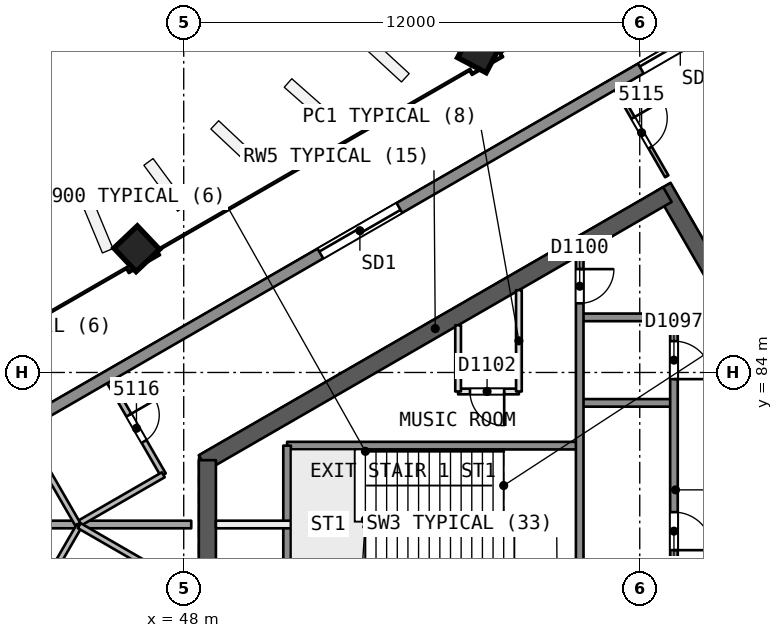
"""IFC4 building model, lengths in metres.
Left out: names, types, materials, properties, quantities, classifications, styles, units other than length and angle.
Written with IfcOpenShell. Run it as: python <this file> out.ifc"""

import sys

from ifc_helpers import new_model, si_unit, direction, frame, frame_2d, origin, origin_2d, place, context, subcontext, project, spatial, rectangle, extrude, element, fill, save


model = new_model("IFC4")
c1 = context("Model", 3, precision=1e-05, world=origin(), true_north=direction((0.0, 1.0)))
c2 = subcontext(c1, "Body", "Model", "MODEL_VIEW")
j1 = project(units=[si_unit("LENGTHUNIT", "METRE"), si_unit("PLANEANGLEUNIT", "RADIAN")], contexts=[c1])
p1 = place(None, origin())
s1 = spatial("IfcSite", under=j1, at=p1, CompositionType="ELEMENT")
p2 = place(p1, origin())
s2 = spatial("IfcBuilding", under=s1, at=p2, CompositionType="ELEMENT")
p3 = place(p2, frame((0.0, 0.0, 209.5)))
s3 = spatial("IfcBuildingStorey", under=s2, at=p3, CompositionType="ELEMENT", Elevation=209.5)
p4 = place(p3, frame((65.74, 80.0, 0.0), z_axis=(0.0, 0.0, 1.0), x_axis=(-0.499991857942, 0.866030104553, 0.0)))
e1 = element("IfcWall", 1, at=p4, inside=s3, PredefinedType="SHEAR", context=c2, shape_type="SweptSolid", body=[
    extrude(rectangle(XDim=10.25, YDim=0.45, at=frame_2d((5.125, 0.0))), origin(), (0.0, 0.0, 1.0), 3.7),
])
p5 = place(p4, frame((0.82, 0.0, 0.0)))
e2 = element("IfcOpeningElement", 2, at=p5, cuts=e1, PredefinedType="OPENING", context=c2, shape_type="SweptSolid", body=[
    extrude(rectangle(XDim=1.2, YDim=2.1, at=frame_2d((0.6, 1.05))), frame((0.0, 0.235, 0.0), z_axis=(0.0, -1.0, 0.0), x_axis=(1.0, 0.0, 0.0)), (0.0, 0.0, 1.0), 0.471),
])
p6 = place(p3, frame((60.728, 88.682, 0.0), z_axis=(0.0, 0.0, 1.0), x_axis=(-0.866021613849, -0.500006564303, 0.0)))
e3 = element("IfcWall", 3, at=p6, inside=s3, PredefinedType="SHEAR", context=c2, shape_type="SweptSolid", body=[
    extrude(rectangle(XDim=14.108, YDim=0.45, at=frame_2d((7.054, 0.0))), origin(), (0.0, 0.0, 1.0), 3.7),
])
p7 = place(p3, frame((48.622, 81.693, 0.0), z_axis=(0.0, 0.0, 1.0), x_axis=(0.0, -1.0, 0.0)))
e4 = element("IfcWall", 4, at=p7, inside=s3, PredefinedType="SHEAR", context=c2, shape_type="SweptSolid", body=[
    extrude(rectangle(XDim=3.515, YDim=0.45, at=frame_2d((1.758, 0.0))), origin(), (0.0, 0.0, 1.0), 3.7),
])
p8 = place(p3, frame((60.728, 71.318, 0.0), z_axis=(0.0, 0.0, 1.0), x_axis=(0.500012416173, 0.866018235185, 0.0)))
e5 = element("IfcWall", 5, at=p8, inside=s3, PredefinedType="SHEAR", context=c2, shape_type="SweptSolid", body=[
    extrude(rectangle(XDim=10.155, YDim=0.45, at=frame_2d((5.078, 0.0))), origin(), (0.0, 0.0, 1.0), 3.7),
])
p9 = place(p8, frame((8.005, 0.0, 0.0)))
e6 = element("IfcOpeningElement", 6, at=p9, cuts=e5, PredefinedType="OPENING", context=c2, shape_type="SweptSolid", body=[
    extrude(rectangle(XDim=1.2, YDim=2.1, at=frame_2d((0.6, 1.05))), frame((0.0, 0.235, 0.0), z_axis=(0.0, -1.0, 0.0), x_axis=(1.0, 0.0, 0.0)), (0.0, 0.0, 1.0), 0.471),
])
p10 = place(p3, frame((55.758, 92.477, 0.0), z_axis=(0.019328516974, -0.012138044789, 0.999739504221), x_axis=(-0.500214302693, 0.865666432488, 0.020181155676)))
e7 = element("IfcColumn", 7, at=p10, inside=s3, PredefinedType="COLUMN", context=c2, shape_type="SweptSolid", body=[
    extrude(rectangle(XDim=0.85, YDim=0.85, at=origin_2d()), origin(), (0.0, 0.0, 1.0), 3.701),
])
p11 = place(p3, frame((46.729, 87.264, 0.0), z_axis=(0.02855911485, -0.006793507689, 0.999569019734), x_axis=(-0.50039805324, 0.86556025987, 0.020179812855)))
e8 = element("IfcColumn", 8, at=p11, inside=s3, PredefinedType="COLUMN", context=c2, shape_type="SweptSolid", body=[
    extrude(rectangle(XDim=0.85, YDim=0.85, at=origin_2d()), origin(), (0.0, 0.0, 1.0), 3.702),
])
p12 = place(p3, frame((59.386, 91.455, 0.0), z_axis=(0.0, 0.0, 1.0), x_axis=(0.49995654735, -0.86605048973, 0.0)))
e9 = element("IfcWall", 9, at=p12, inside=s3, PredefinedType="PARTITIONING", context=c2, shape_type="SweptSolid", body=[
    extrude(rectangle(XDim=2.648, YDim=0.1, at=frame_2d((1.324, 0.0))), origin(), (0.0, 0.0, 1.0), 3.3),
])
p13 = place(p12, frame((0.874, 0.0, 0.0)))
e10 = element("IfcOpeningElement", 10, at=p13, cuts=e9, PredefinedType="OPENING", context=c2, shape_type="SweptSolid", body=[
    extrude(rectangle(XDim=0.9, YDim=2.1, at=frame_2d((0.45, 1.05))), frame((0.0, 0.061, 0.0), z_axis=(0.0, -1.0, 0.0), x_axis=(1.0, 0.0, 0.0)), (0.0, 0.0, 1.0), 0.121),
])
p14 = place(p3, frame((46.05, 83.755, 0.0), z_axis=(0.0, 0.0, 1.0), x_axis=(0.500051559782, -0.865995633684, 0.0)))
e11 = element("IfcWall", 11, at=p14, inside=s3, PredefinedType="PARTITIONING", context=c2, shape_type="SweptSolid", body=[
    extrude(rectangle(XDim=2.825, YDim=0.15, at=frame_2d((1.413, 0.0))), origin(), (0.0, 0.0, 1.0), 3.3),
])
p15 = place(p14, frame((1.013, 0.0, 0.0)))
e12 = element("IfcOpeningElement", 12, at=p15, cuts=e11, PredefinedType="OPENING", context=c2, shape_type="SweptSolid", body=[
    extrude(rectangle(XDim=0.8, YDim=2.1, at=frame_2d((0.4, 1.05))), frame((0.0, 0.085, 0.0), z_axis=(0.0, -1.0, 0.0), x_axis=(1.0, 0.0, 0.0)), (0.0, 0.0, 1.0), 0.171),
])
p16 = place(p3, frame((47.462, 81.308, 0.0), z_axis=(0.0, 0.0, 1.0), x_axis=(-0.866021400173, -0.500006934395, 0.0)))
e13 = element("IfcWall", 13, at=p16, inside=s3, PredefinedType="PARTITIONING", context=c2, shape_type="SweptSolid", body=[
    extrude(rectangle(XDim=2.6, YDim=0.15, at=frame_2d((1.3, 0.0))), origin(), (0.0, 0.0, 1.0), 3.3),
])
p17 = place(p3, frame((45.211, 80.008, 0.0), z_axis=(0.0, 0.0, 1.0), x_axis=(-0.499954589381, 0.86605162003, 0.0)))
e14 = element("IfcWall", 14, at=p17, inside=s3, PredefinedType="PARTITIONING", context=c2, shape_type="SweptSolid", body=[
    extrude(rectangle(XDim=2.519, YDim=0.15, at=frame_2d((1.259, 0.0))), origin(), (0.0, 0.0, 1.0), 3.3),
])
p18 = place(p3, frame((43.951, 80.0, 0.0), z_axis=(0.0, 0.0, 1.0), x_axis=(1.0, 0.0, 0.0)))
e15 = element("IfcWall", 15, at=p18, inside=s3, PredefinedType="PARTITIONING", context=c2, shape_type="SweptSolid", body=[
    extrude(rectangle(XDim=4.247, YDim=0.2, at=frame_2d((2.123, 0.0))), origin(), (0.0, 0.0, 1.0), 3.3),
])
p19 = place(p3, frame((43.951, 77.718, 0.0), z_axis=(0.0, 0.0, 1.0), x_axis=(0.499988060406, 0.866032297002, 0.0)))
e16 = element("IfcWall", 16, at=p19, inside=s3, PredefinedType="PARTITIONING", context=c2, shape_type="SweptSolid", body=[
    extrude(rectangle(XDim=2.599, YDim=0.15, at=frame_2d((1.3, 0.0))), origin(), (0.0, 0.0, 1.0), 3.3),
])
p20 = place(p3, frame((45.251, 79.969, 0.0), z_axis=(0.0, 0.0, 1.0), x_axis=(0.866062058628, -0.499936506574, 0.0)))
e17 = element("IfcWall", 17, at=p20, inside=s3, PredefinedType="PARTITIONING", context=c2, shape_type="SweptSolid", body=[
    extrude(rectangle(XDim=2.6, YDim=0.15, at=frame_2d((1.3, 0.0))), origin(), (0.0, 0.0, 1.0), 3.3),
])
p21 = place(p3, frame((43.802, 82.63, 0.0), z_axis=(0.0, 0.0, 1.0), x_axis=(0.866026224187, 0.499998579018, 0.0)))
e18 = element("IfcWall", 18, at=p21, inside=s3, PredefinedType="SOLIDWALL", context=c2, shape_type="SweptSolid", body=[
    extrude(rectangle(XDim=51.406, YDim=0.3, at=frame_2d((25.703, 0.0))), origin(), (0.0, 0.0, 1.0), 3.3),
])
p22 = place(p21, frame((24.503, 0.0, 0.0)))
e19 = element("IfcOpeningElement", 19, at=p22, cuts=e18, PredefinedType="OPENING", context=c2, shape_type="SweptSolid", body=[
    extrude(rectangle(XDim=2.4, YDim=2.4, at=frame_2d((1.2, 1.2))), frame((0.0, 0.161, 0.0), z_axis=(0.0, -1.0, 0.0), x_axis=(1.0, 0.0, 0.0)), (0.0, 0.0, 1.0), 0.321),
])
p23 = place(p21, frame((30.271, 0.0, 0.0)))
e20 = element("IfcOpeningElement", 20, at=p23, cuts=e18, PredefinedType="OPENING", context=c2, shape_type="SweptSolid", body=[
    extrude(rectangle(XDim=2.4, YDim=2.4, at=frame_2d((1.2, 1.2))), frame((0.0, 0.161, 0.0), z_axis=(0.0, -1.0, 0.0), x_axis=(1.0, 0.0, 0.0)), (0.0, 0.0, 1.0), 0.321),
])
p24 = place(p21, frame((39.983, 0.0, 0.0)))
e21 = element("IfcOpeningElement", 21, at=p24, cuts=e18, PredefinedType="OPENING", context=c2, shape_type="SweptSolid", body=[
    extrude(rectangle(XDim=2.4, YDim=2.4, at=frame_2d((1.2, 1.2))), frame((0.0, 0.161, 0.0), z_axis=(0.0, -1.0, 0.0), x_axis=(1.0, 0.0, 0.0)), (0.0, 0.0, 1.0), 0.321),
])
p25 = place(p21, frame((18.736, 0.0, 0.0)))
e22 = element("IfcOpeningElement", 22, at=p25, cuts=e18, PredefinedType="OPENING", context=c2, shape_type="SweptSolid", body=[
    extrude(rectangle(XDim=2.4, YDim=2.4, at=frame_2d((1.2, 1.2))), frame((0.0, 0.161, 0.0), z_axis=(0.0, -1.0, 0.0), x_axis=(1.0, 0.0, 0.0)), (0.0, 0.0, 1.0), 0.321),
])
p26 = place(p21, frame((9.0, 0.0, 0.0)))
e23 = element("IfcOpeningElement", 23, at=p26, cuts=e18, PredefinedType="OPENING", context=c2, shape_type="SweptSolid", body=[
    extrude(rectangle(XDim=2.4, YDim=2.4, at=frame_2d((1.2, 1.2))), frame((0.0, 0.161, 0.0), z_axis=(0.0, -1.0, 0.0), x_axis=(1.0, 0.0, 0.0)), (0.0, 0.0, 1.0), 0.321),
])
p27 = place(p3, frame((60.9, 85.45, 0.0), z_axis=(0.0, 0.0, 1.0), x_axis=(-1.0, 0.0, 0.0)))
e24 = element("IfcWall", 24, at=p27, inside=s3, PredefinedType="SOLIDWALL", context=c2, shape_type="SweptSolid", body=[
    extrude(rectangle(XDim=2.48, YDim=0.2, at=frame_2d((1.24, 0.0))), origin(), (0.0, 0.0, 1.0), 3.3),
])
p28 = place(p3, frame((56.82, 83.5, 0.0), z_axis=(0.0, 0.0, 1.0), x_axis=(-1.0, 0.0, 0.0)))
e25 = element("IfcWall", 25, at=p28, inside=s3, PredefinedType="PARTITIONING", context=c2, shape_type="SweptSolid", body=[
    extrude(rectangle(XDim=1.6, YDim=0.15, at=frame_2d((0.8, 0.0))), origin(), (0.0, 0.0, 1.0), 3.3),
])
p29 = place(p28, frame((0.387, 0.0, 0.0)))
e26 = element("IfcOpeningElement", 26, at=p29, cuts=e25, PredefinedType="OPENING", context=c2, shape_type="SweptSolid", body=[
    extrude(rectangle(XDim=0.9, YDim=2.1, at=frame_2d((0.45, 1.05))), frame((0.0, 0.085, 0.0), z_axis=(0.0, -1.0, 0.0), x_axis=(1.0, 0.0, 0.0)), (0.0, 0.0, 1.0), 0.171),
])
p30 = place(p3, frame((60.9, 83.2, 0.0), z_axis=(0.0, 0.0, 1.0), x_axis=(-1.0, 0.0, 0.0)))
e27 = element("IfcWall", 27, at=p30, inside=s3, PredefinedType="SOLIDWALL", context=c2, shape_type="SweptSolid", body=[
    extrude(rectangle(XDim=2.48, YDim=0.2, at=frame_2d((1.24, 0.0))), origin(), (0.0, 0.0, 1.0), 3.3),
])
p31 = place(p3, frame((58.42, 82.075, 0.0), z_axis=(0.0, 0.0, 1.0), x_axis=(-1.0, 0.0, 0.0)))
e28 = element("IfcWall", 28, at=p31, inside=s3, PredefinedType="SOLIDWALL", context=c2, shape_type="SweptSolid", body=[
    extrude(rectangle(XDim=7.7, YDim=0.2, at=frame_2d((3.85, 0.0))), origin(), (0.0, 0.0, 1.0), 3.3),
])
p32 = place(p3, frame((50.82, 80.0, 0.0), z_axis=(0.0, 0.0, 1.0), x_axis=(-1.0, 0.0, 0.0)))
e29 = element("IfcWall", 29, at=p32, inside=s3, PredefinedType="PARTITIONING", context=c2, shape_type="SweptSolid", body=[
    extrude(rectangle(XDim=1.973, YDim=0.2, at=frame_2d((0.987, 0.0))), origin(), (0.0, 0.0, 1.0), 3.3),
])
p33 = place(p3, frame((60.9, 85.45, 0.0), z_axis=(0.0, 0.0, 1.0), x_axis=(0.0, -1.0, 0.0)))
e30 = element("IfcWall", 30, at=p33, inside=s3, PredefinedType="SOLIDWALL", context=c2, shape_type="SweptSolid", body=[
    extrude(rectangle(XDim=10.9, YDim=0.2, at=frame_2d((5.45, 0.0))), origin(), (0.0, 0.0, 1.0), 3.3),
])
p34 = place(p33, frame((0.625, 0.0, 0.0)))
e31 = element("IfcOpeningElement", 31, at=p34, cuts=e30, PredefinedType="OPENING", context=c2, shape_type="SweptSolid", body=[
    extrude(rectangle(XDim=1.0, YDim=2.1, at=frame_2d((0.5, 1.05))), frame((0.0, 0.11, 0.0), z_axis=(0.0, -1.0, 0.0), x_axis=(1.0, 0.0, 0.0)), (0.0, 0.0, 1.0), 0.221),
])
p35 = place(p33, frame((5.125, 0.0, 0.0)))
e32 = element("IfcOpeningElement", 32, at=p35, cuts=e30, PredefinedType="OPENING", context=c2, shape_type="SweptSolid", body=[
    extrude(rectangle(XDim=1.0, YDim=2.1, at=frame_2d((0.5, 1.05))), frame((0.0, 0.11, 0.0), z_axis=(0.0, -1.0, 0.0), x_axis=(1.0, 0.0, 0.0)), (0.0, 0.0, 1.0), 0.221),
])
p36 = place(p3, frame((58.42, 87.09, 0.0), z_axis=(0.0, 0.0, 1.0), x_axis=(0.0, -1.0, 0.0)))
e33 = element("IfcWall", 33, at=p36, inside=s3, PredefinedType="SOLIDWALL", context=c2, shape_type="SweptSolid", body=[
    extrude(rectangle(XDim=10.64, YDim=0.2, at=frame_2d((5.32, 0.0))), origin(), (0.0, 0.0, 1.0), 3.3),
])
p37 = place(p36, frame((0.37, 0.0, 0.0)))
e34 = element("IfcOpeningElement", 34, at=p37, cuts=e33, PredefinedType="OPENING", context=c2, shape_type="SweptSolid", body=[
    extrude(rectangle(XDim=0.9, YDim=2.1, at=frame_2d((0.45, 1.05))), frame((0.0, 0.11, 0.0), z_axis=(0.0, -1.0, 0.0), x_axis=(1.0, 0.0, 0.0)), (0.0, 0.0, 1.0), 0.221),
])
p38 = place(p3, frame((56.82, 86.166, 0.0), z_axis=(0.0, 0.0, 1.0), x_axis=(0.0, -1.0, 0.0)))
e35 = element("IfcWall", 35, at=p38, inside=s3, PredefinedType="PARTITIONING", context=c2, shape_type="SweptSolid", body=[
    extrude(rectangle(XDim=2.666, YDim=0.15, at=frame_2d((1.333, 0.0))), origin(), (0.0, 0.0, 1.0), 3.3),
])
p39 = place(p3, frame((55.22, 85.242, 0.0), z_axis=(0.0, 0.0, 1.0), x_axis=(0.0, -1.0, 0.0)))
e36 = element("IfcWall", 36, at=p39, inside=s3, PredefinedType="PARTITIONING", context=c2, shape_type="SweptSolid", body=[
    extrude(rectangle(XDim=1.742, YDim=0.15, at=frame_2d((0.871, 0.0))), origin(), (0.0, 0.0, 1.0), 3.3),
])
p40 = place(p3, frame((50.72, 82.075, 0.0), z_axis=(0.0, 0.0, 1.0), x_axis=(0.0, -1.0, 0.0)))
e37 = element("IfcWall", 37, at=p40, inside=s3, PredefinedType="SOLIDWALL", context=c2, shape_type="SweptSolid", body=[
    extrude(rectangle(XDim=4.15, YDim=0.2, at=frame_2d((2.075, 0.0))), origin(), (0.0, 0.0, 1.0), 3.3),
])
p41 = place(p13, origin())
e38 = element("IfcDoor", 38, at=p41, inside=s3, OperationType="SINGLE_SWING_LEFT", PredefinedType="NOTDEFINED", context=c2, shape_type="SweptSolid", body=[
    extrude(rectangle(XDim=0.9, YDim=2.1, at=frame_2d((0.45, 1.05))), frame((0.0, 0.025, 0.0), z_axis=(0.0, -1.0, 0.0), x_axis=(1.0, 0.0, 0.0)), (0.0, 0.0, 1.0), 0.05),
])
fill(e10, e38)
p42 = place(p15, origin())
e39 = element("IfcDoor", 39, at=p42, inside=s3, OperationType="SINGLE_SWING_LEFT", PredefinedType="NOTDEFINED", context=c2, shape_type="SweptSolid", body=[
    extrude(rectangle(XDim=0.8, YDim=2.1, at=frame_2d((0.4, 1.05))), frame((0.0, 0.025, 0.0), z_axis=(0.0, -1.0, 0.0), x_axis=(1.0, 0.0, 0.0)), (0.0, 0.0, 1.0), 0.05),
])
fill(e12, e39)
p43 = place(p25, origin())
e40 = element("IfcDoor", 40, at=p43, inside=s3, OperationType="SLIDING_TO_RIGHT", PredefinedType="NOTDEFINED", context=c2, shape_type="SweptSolid", body=[
    extrude(rectangle(XDim=2.4, YDim=2.4, at=frame_2d((1.2, 1.2))), frame((0.0, 0.025, 0.0), z_axis=(0.0, -1.0, 0.0), x_axis=(1.0, 0.0, 0.0)), (0.0, 0.0, 1.0), 0.05),
])
fill(e22, e40)
p44 = place(p26, origin())
e41 = element("IfcDoor", 41, at=p44, inside=s3, OperationType="SLIDING_TO_LEFT", PredefinedType="NOTDEFINED", context=c2, shape_type="SweptSolid", body=[
    extrude(rectangle(XDim=2.4, YDim=2.4, at=frame_2d((1.2, 1.2))), frame((0.0, 0.025, 0.0), z_axis=(0.0, -1.0, 0.0), x_axis=(1.0, 0.0, 0.0)), (0.0, 0.0, 1.0), 0.05),
])
fill(e23, e41)
p45 = place(p34, origin())
e42 = element("IfcDoor", 42, at=p45, inside=s3, OperationType="SINGLE_SWING_RIGHT", PredefinedType="NOTDEFINED", context=c2, shape_type="SweptSolid", body=[
    extrude(rectangle(XDim=1.0, YDim=2.1, at=frame_2d((0.5, 1.05))), frame((0.0, 0.025, 0.0), z_axis=(0.0, -1.0, 0.0), x_axis=(1.0, 0.0, 0.0)), (0.0, 0.0, 1.0), 0.05),
])
fill(e31, e42)
p46 = place(p35, origin())
e43 = element("IfcDoor", 43, at=p46, inside=s3, OperationType="SINGLE_SWING_RIGHT", PredefinedType="NOTDEFINED", context=c2, shape_type="SweptSolid", body=[
    extrude(rectangle(XDim=1.0, YDim=2.1, at=frame_2d((0.5, 1.05))), frame((0.0, 0.025, 0.0), z_axis=(0.0, -1.0, 0.0), x_axis=(1.0, 0.0, 0.0)), (0.0, 0.0, 1.0), 0.05),
])
fill(e32, e43)
p47 = place(p37, origin())
e44 = element("IfcDoor", 44, at=p47, inside=s3, OperationType="SINGLE_SWING_LEFT", PredefinedType="NOTDEFINED", context=c2, shape_type="SweptSolid", body=[
    extrude(rectangle(XDim=0.9, YDim=2.1, at=frame_2d((0.45, 1.05))), frame((0.0, 0.025, 0.0), z_axis=(0.0, -1.0, 0.0), x_axis=(1.0, 0.0, 0.0)), (0.0, 0.0, 1.0), 0.05),
])
fill(e34, e44)
p48 = place(p29, origin())
e45 = element("IfcDoor", 45, at=p48, inside=s3, OperationType="SINGLE_SWING_LEFT", PredefinedType="NOTDEFINED", context=c2, shape_type="SweptSolid", body=[
    extrude(rectangle(XDim=0.9, YDim=2.1, at=frame_2d((0.45, 1.05))), frame((0.0, 0.025, 0.0), z_axis=(0.0, -1.0, 0.0), x_axis=(1.0, 0.0, 0.0)), (0.0, 0.0, 1.0), 0.05),
])
fill(e26, e45)
save(model, sys.argv[1])
